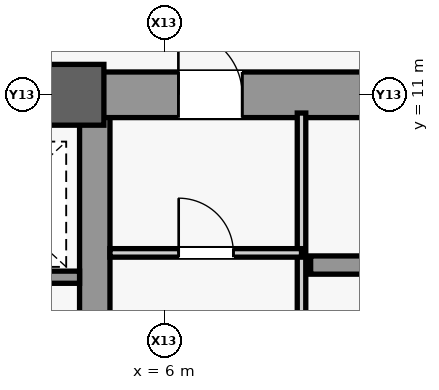
"""IFC4 building model, lengths in metres.
Left out: names, types, materials, properties, quantities, classifications, styles, units other than length and angle.
Written with IfcOpenShell. Run it as: python <this file> out.ifc"""

import sys

from ifc_helpers import new_model, si_unit, direction, frame, frame_2d, origin, origin_2d, place, context, subcontext, project, spatial, rectangle, extrude, source, transform, mapped, element, fill, save


model = new_model("IFC4")
c1 = context("Model", 3, precision=1e-05, world=origin(), true_north=direction((0.0, 1.0)))
c2 = subcontext(c1, "Body", "Model", "MODEL_VIEW")
j1 = project(units=[si_unit("LENGTHUNIT", "METRE"), si_unit("PLANEANGLEUNIT", "RADIAN")], contexts=[c1])
p1 = place(None, origin())
s1 = spatial("IfcSite", under=j1, at=p1, CompositionType="ELEMENT")
p2 = place(p1, origin())
s2 = spatial("IfcBuilding", under=s1, at=p2, CompositionType="ELEMENT")
p3 = place(p2, frame((0.0, 0.0, 103.7)))
s3 = spatial("IfcBuildingStorey", under=s2, at=p3, CompositionType="ELEMENT", Elevation=103.7)
m1 = source(origin(), c2, "Body", "SweptSolid", [
    extrude(rectangle(XDim=21.4, YDim=0.5, at=frame_2d((10.7, 0.0))), origin(), (0.0, 0.0, 1.0), 3.84),
])
p4 = place(p3, frame((4.85, -10.7, 0.0), z_axis=(0.0, 0.0, 1.0), x_axis=(0.0, 1.0, 0.0)))
e1 = element("IfcWall", 1, at=p4, inside=s3, PredefinedType="SHEAR", context=c2, shape_type="MappedRepresentation", body=[
    mapped(m1, transform((0.0, 0.0, 0.0), scale=1.0)),
])
m2 = source(origin(), c2, "Body", "SweptSolid", [
    extrude(rectangle(XDim=5.85, YDim=0.75, at=frame_2d((2.925, 0.0))), origin(), (0.0, 0.0, 1.0), 3.84),
])
p5 = place(p3, frame((4.85, 11.0, 0.0), z_axis=(0.0, 0.0, 1.0), x_axis=(1.0, 0.0, 0.0)))
e2 = element("IfcWall", 2, at=p5, inside=s3, PredefinedType="SHEAR", context=c2, shape_type="MappedRepresentation", body=[
    mapped(m2, transform((0.0, 0.0, 0.0), scale=1.0)),
])
m3 = source(origin(), c2, "Body", "SweptSolid", [
    extrude(rectangle(XDim=1.05, YDim=2.2, at=frame_2d((0.525, 1.1))), frame((0.0, 0.385, 0.0), z_axis=(0.0, -1.0, 0.0), x_axis=(1.0, 0.0, 0.0)), (0.0, 0.0, 1.0), 0.77),
])
p6 = place(p5, frame((1.375, 0.0, 0.0)))
e3 = element("IfcOpeningElement", 3, at=p6, cuts=e2, PredefinedType="OPENING", context=c2, shape_type="MappedRepresentation", body=[
    mapped(m3, transform((0.0, 0.0, 0.0), scale=1.0)),
])
m4 = source(origin(), c2, "Body", "SweptSolid", [
    extrude(rectangle(XDim=9.2, YDim=0.5, at=frame_2d((4.6, 0.0))), origin(), (0.0, 0.0, 1.0), 3.84),
])
p7 = place(p3, frame((-4.6, 11.0, 0.0), z_axis=(0.0, 0.0, 1.0), x_axis=(1.0, 0.0, 0.0)))
e4 = element("IfcWall", 4, at=p7, inside=s3, PredefinedType="SHEAR", context=c2, shape_type="MappedRepresentation", body=[
    mapped(m4, transform((0.0, 0.0, 0.0), scale=1.0)),
])
m5 = source(origin(), c2, "Body", "SweptSolid", [
    extrude(rectangle(XDim=1.8, YDim=2.25, at=frame_2d((0.9, 1.125))), frame((0.0, 0.26, 0.0), z_axis=(0.0, -1.0, 0.0), x_axis=(1.0, 0.0, 0.0)), (0.0, 0.0, 1.0), 0.52),
])
p8 = place(p7, frame((3.7, 0.0, 0.0)))
e5 = element("IfcOpeningElement", 5, at=p8, cuts=e4, PredefinedType="OPENING", context=c2, shape_type="MappedRepresentation", body=[
    mapped(m5, transform((0.0, 0.0, 0.0), scale=1.0)),
])
m6 = source(origin(), c2, "Body", "SweptSolid", [
    extrude(rectangle(XDim=1.0, YDim=1.0, at=origin_2d()), origin(), (0.0, 0.0, 1.0), 4.1),
])
p9 = place(p3, frame((4.5, 11.0, 0.0), z_axis=(0.0, 0.0, 1.0), x_axis=(1.0, 0.0, 0.0)))
e6 = element("IfcColumn", 6, at=p9, inside=s3, PredefinedType="COLUMN", context=c2, shape_type="MappedRepresentation", body=[
    mapped(m6, transform((0.0, 0.0, 0.0), scale=1.0)),
])
m7 = source(origin(), c2, "Body", "SweptSolid", [
    extrude(rectangle(XDim=2.3, YDim=0.3, at=frame_2d((1.15, 0.0))), origin(), (0.0, 0.0, 1.0), 3.84),
])
p10 = place(p3, frame((8.4, 8.2, 0.0), z_axis=(0.0, 0.0, 1.0), x_axis=(1.0, 0.0, 0.0)))
e7 = element("IfcWall", 7, at=p10, inside=s3, PredefinedType="SHEAR", context=c2, shape_type="MappedRepresentation", body=[
    mapped(m7, transform((0.0, 0.0, 0.0), scale=1.0)),
])
m8 = source(origin(), c2, "Body", "SweptSolid", [
    extrude(rectangle(XDim=9.4, YDim=0.14, at=frame_2d((4.7, 0.0))), origin(), (0.0, 0.0, 1.0), 3.84),
])
p11 = place(p3, frame((8.25, 1.3, 0.0), z_axis=(0.0, 0.0, 1.0), x_axis=(0.0, 1.0, 0.0)))
e8 = element("IfcWall", 8, at=p11, inside=s3, PredefinedType="PARTITIONING", context=c2, shape_type="MappedRepresentation", body=[
    mapped(m8, transform((0.0, 0.0, 0.0), scale=1.0)),
])
m9 = source(origin(), c2, "Body", "SweptSolid", [
    extrude(rectangle(XDim=3.15, YDim=0.14, at=frame_2d((1.575, 0.0))), origin(), (0.0, 0.0, 1.0), 3.84),
])
p12 = place(p3, frame((5.1, 8.4, 0.0), z_axis=(0.0, 0.0, 1.0), x_axis=(1.0, 0.0, 0.0)))
e9 = element("IfcWall", 9, at=p12, inside=s3, PredefinedType="PARTITIONING", context=c2, shape_type="MappedRepresentation", body=[
    mapped(m9, transform((0.0, 0.0, 0.0), scale=1.0)),
])
m10 = source(origin(), c2, "Body", "SweptSolid", [
    extrude(rectangle(XDim=0.9, YDim=2.15, at=frame_2d((0.45, 1.075))), frame((0.0, 0.08, 0.0), z_axis=(0.0, -1.0, 0.0), x_axis=(1.0, 0.0, 0.0)), (0.0, 0.0, 1.0), 0.16),
])
p13 = place(p12, frame((1.13, 0.0, 0.0)))
e10 = element("IfcOpeningElement", 10, at=p13, cuts=e9, PredefinedType="OPENING", context=c2, shape_type="MappedRepresentation", body=[
    mapped(m10, transform((0.0, 0.0, 0.0), scale=1.0)),
])
m11 = source(origin(), c2, "Body", "SweptSolid", [
    extrude(rectangle(XDim=2.45, YDim=0.2, at=frame_2d((1.225, 0.0))), origin(), (0.0, 0.0, 1.0), 3.84),
])
p14 = place(p3, frame((2.15, 8.0, 0.0), z_axis=(0.0, 0.0, 1.0), x_axis=(1.0, 0.0, 0.0)))
e11 = element("IfcWall", 11, at=p14, inside=s3, PredefinedType="SHEAR", context=c2, shape_type="MappedRepresentation", body=[
    mapped(m11, transform((0.0, 0.0, 0.0), scale=1.0)),
])
m12 = source(origin(), c2, "Body", "SweptSolid", [
    extrude(rectangle(XDim=1.05, YDim=2.2, at=frame_2d((0.525, 1.1))), frame((0.0, 0.025, 0.0), z_axis=(0.0, -1.0, 0.0), x_axis=(1.0, 0.0, 0.0)), (0.0, 0.0, 1.0), 0.05),
])
p15 = place(p6, origin())
e12 = element("IfcDoor", 12, at=p15, inside=s3, OperationType="SINGLE_SWING_LEFT", PredefinedType="DOOR", context=c2, shape_type="MappedRepresentation", body=[
    mapped(m12, transform((0.0, 0.0, 0.0), scale=1.0)),
])
fill(e3, e12)
m13 = source(origin(), c2, "Body", "SweptSolid", [
    extrude(rectangle(XDim=0.9, YDim=2.15, at=frame_2d((0.45, 1.075))), frame((0.0, 0.025, 0.0), z_axis=(0.0, -1.0, 0.0), x_axis=(1.0, 0.0, 0.0)), (0.0, 0.0, 1.0), 0.05),
])
p16 = place(p13, origin())
e13 = element("IfcDoor", 13, at=p16, inside=s3, OperationType="SINGLE_SWING_LEFT", PredefinedType="DOOR", context=c2, shape_type="MappedRepresentation", body=[
    mapped(m13, transform((0.0, 0.0, 0.0), scale=1.0)),
])
fill(e10, e13)
save(model, sys.argv[1])
